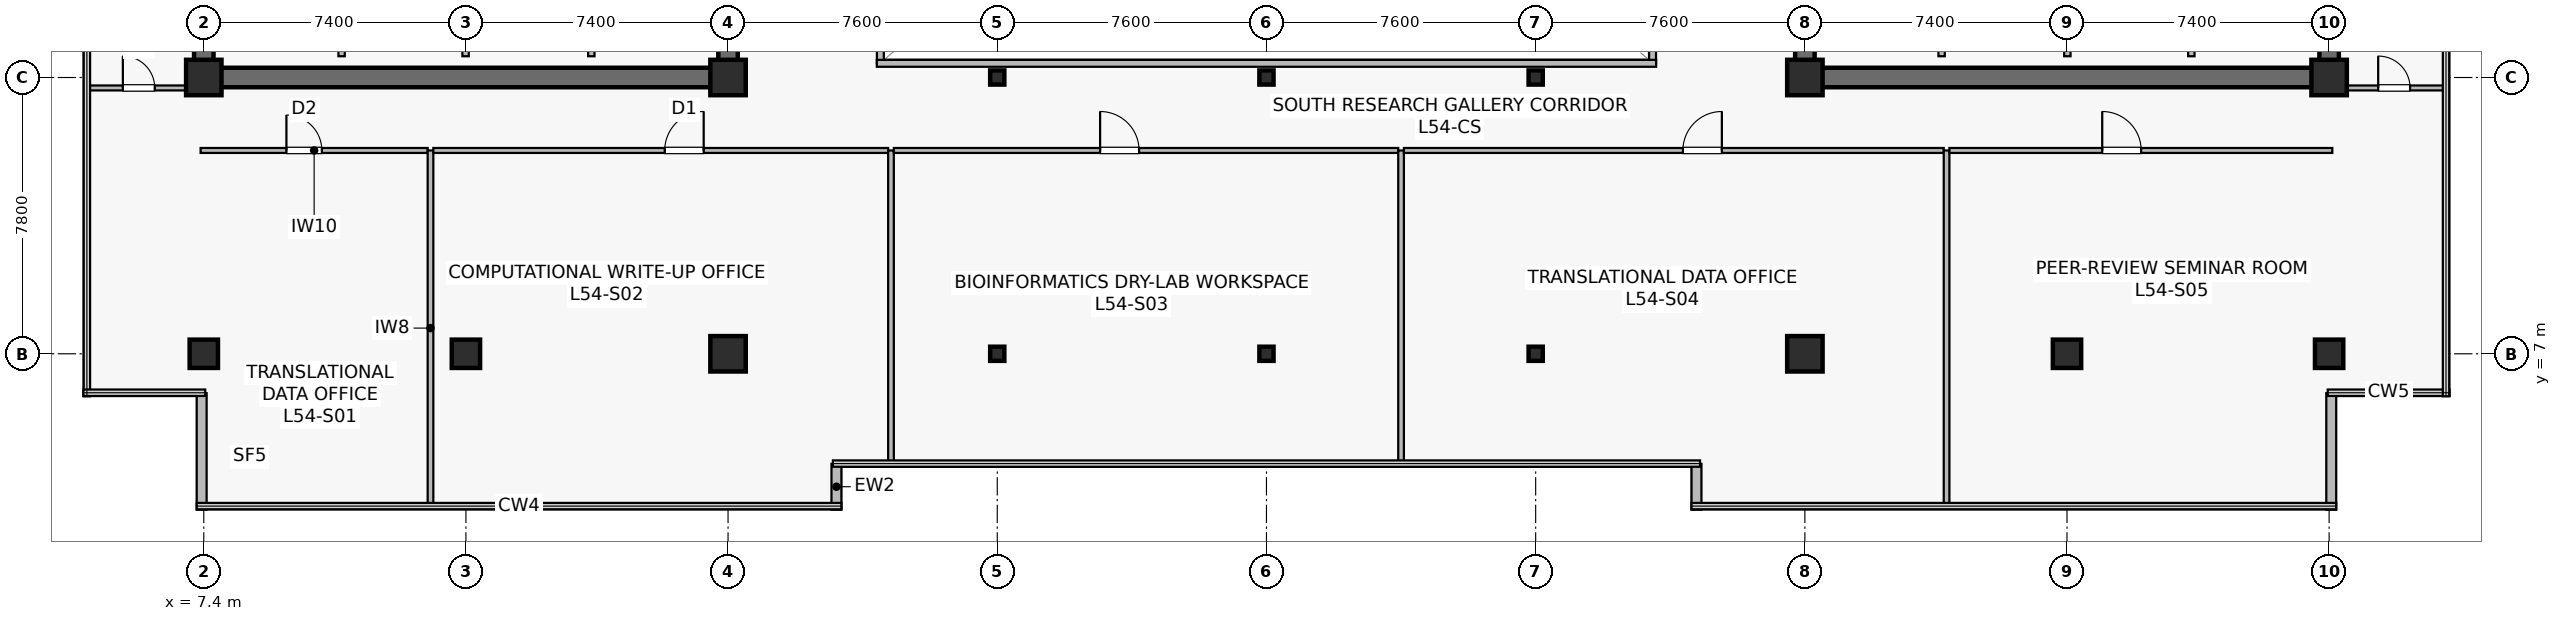
"""IFC4 building model, lengths in metres.
Left out: names, types, materials, properties, quantities, classifications, styles, units other than length and angle.
Written with IfcOpenShell. Run it as: python <this file> out.ifc"""

import sys

from ifc_helpers import new_model, si_unit, direction, frame, frame_2d, origin, origin_2d, place, context, subcontext, project, spatial, rectangle, hollow_rectangle, extrude, source, transform, mapped, element, fill, save


model = new_model("IFC4")
c1 = context("Model", 3, precision=1e-05, world=origin(), true_north=direction((0.0, 1.0)))
c2 = subcontext(c1, "Body", "Model", "MODEL_VIEW")
j1 = project(units=[si_unit("LENGTHUNIT", "METRE"), si_unit("PLANEANGLEUNIT", "RADIAN")], contexts=[c1])
p1 = place(None, origin())
s1 = spatial("IfcSite", under=j1, at=p1, CompositionType="ELEMENT")
p2 = place(p1, origin())
s2 = spatial("IfcBuilding", under=s1, at=p2, CompositionType="ELEMENT")
p3 = place(p2, frame((0.0, 0.0, 226.0)))
s3 = spatial("IfcBuildingStorey", under=s2, at=p3, CompositionType="ELEMENT", Elevation=226.0)
p4 = place(p3, frame((7.125, 14.8, 0.0), z_axis=(0.0, 0.0, 1.0), x_axis=(1.0, 0.0, 0.0)))
e1 = element("IfcWall", 1, at=p4, inside=s3, PredefinedType="SHEAR", context=c2, shape_type="SweptSolid", body=[
    extrude(rectangle(XDim=15.35, YDim=0.55, at=frame_2d((7.675, 0.0))), origin(), (0.0, 0.0, 1.0), 3.8),
])
p5 = place(p3, frame((7.4, 15.075, 0.0), z_axis=(0.0, 0.0, 1.0), x_axis=(0.0, 1.0, 0.0)))
e2 = element("IfcWall", 2, at=p5, inside=s3, PredefinedType="SHEAR", context=c2, shape_type="SweptSolid", body=[
    extrude(rectangle(XDim=18.45, YDim=0.55, at=frame_2d((9.225, 0.0))), origin(), (0.0, 0.0, 1.0), 3.8),
])
p6 = place(p3, frame((22.2, 15.075, 0.0), z_axis=(0.0, 0.0, 1.0), x_axis=(0.0, 1.0, 0.0)))
e3 = element("IfcWall", 3, at=p6, inside=s3, PredefinedType="SHEAR", context=c2, shape_type="SweptSolid", body=[
    extrude(rectangle(XDim=18.45, YDim=0.55, at=frame_2d((9.225, 0.0))), origin(), (0.0, 0.0, 1.0), 3.8),
])
p7 = place(p6, frame((3.475, 0.0, 0.0)))
e4 = element("IfcOpeningElement", 4, at=p7, cuts=e3, PredefinedType="OPENING", context=c2, shape_type="SweptSolid", body=[
    extrude(rectangle(XDim=1.42, YDim=2.2, at=frame_2d((0.71, 1.1))), frame((0.0, 0.285, 0.0), z_axis=(0.0, -1.0, 0.0), x_axis=(1.0, 0.0, 0.0)), (0.0, 0.0, 1.0), 0.57),
])
p8 = place(p3, frame((52.325, 14.8, 0.0), z_axis=(0.0, 0.0, 1.0), x_axis=(1.0, 0.0, 0.0)))
e5 = element("IfcWall", 5, at=p8, inside=s3, PredefinedType="SHEAR", context=c2, shape_type="SweptSolid", body=[
    extrude(rectangle(XDim=15.35, YDim=0.55, at=frame_2d((7.675, 0.0))), origin(), (0.0, 0.0, 1.0), 3.8),
])
p9 = place(p3, frame((52.6, 15.075, 0.0), z_axis=(0.0, 0.0, 1.0), x_axis=(0.0, 1.0, 0.0)))
e6 = element("IfcWall", 6, at=p9, inside=s3, PredefinedType="SHEAR", context=c2, shape_type="SweptSolid", body=[
    extrude(rectangle(XDim=18.45, YDim=0.55, at=frame_2d((9.225, 0.0))), origin(), (0.0, 0.0, 1.0), 3.8),
])
p10 = place(p9, frame((3.475, 0.0, 0.0)))
e7 = element("IfcOpeningElement", 7, at=p10, cuts=e6, PredefinedType="OPENING", context=c2, shape_type="SweptSolid", body=[
    extrude(rectangle(XDim=1.42, YDim=2.2, at=frame_2d((0.71, 1.1))), frame((0.0, 0.285, 0.0), z_axis=(0.0, -1.0, 0.0), x_axis=(1.0, 0.0, 0.0)), (0.0, 0.0, 1.0), 0.57),
])
p11 = place(p3, frame((67.4, 15.075, 0.0), z_axis=(0.0, 0.0, 1.0), x_axis=(0.0, 1.0, 0.0)))
e8 = element("IfcWall", 8, at=p11, inside=s3, PredefinedType="SHEAR", context=c2, shape_type="SweptSolid", body=[
    extrude(rectangle(XDim=18.45, YDim=0.55, at=frame_2d((9.225, 0.0))), origin(), (0.0, 0.0, 1.0), 3.8),
])
m1 = source(origin(), c2, "Body", "SweptSolid", [
    extrude(rectangle(XDim=0.8, YDim=0.8, at=origin_2d()), origin(), (0.0, 0.0, 1.0), 4.1),
])
p12 = place(p3, frame((14.8, 7.0, 0.0), z_axis=(0.0, 0.0, 1.0), x_axis=(1.0, 0.0, 0.0)))
e9 = element("IfcColumn", 9, at=p12, inside=s3, PredefinedType="COLUMN", context=c2, shape_type="MappedRepresentation", body=[
    mapped(m1, transform((0.0, 0.0, 0.0), scale=1.0)),
])
m2 = source(origin(), c2, "Body", "SweptSolid", [
    extrude(rectangle(XDim=1.0, YDim=1.0, at=origin_2d()), origin(), (0.0, 0.0, 1.0), 4.1),
])
for number, where, z_axis, x_axis in (
    (10, (22.2, 7.0, 0.0), (0.0, 0.0, 1.0), (1.0, 0.0, 0.0)),
    (11, (7.4, 14.8, 0.0), (0.0, 0.0, 1.0), (1.0, 0.0, 0.0)),
    (12, (22.2, 14.8, 0.0), (0.0, 0.0, 1.0), (1.0, 0.0, 0.0)),
    (13, (52.6, 7.0, 0.0), (0.0, 0.0, 1.0), (1.0, 0.0, 0.0)),
):
    element("IfcColumn", number, at=place(p3, frame(where, z_axis=z_axis, x_axis=x_axis)), inside=s3, PredefinedType="COLUMN", context=c2, shape_type="MappedRepresentation", body=[
        mapped(m2, transform((0.0, 0.0, 0.0), scale=1.0)),
    ])
p13 = place(p3, frame((60.0, 7.0, 0.0), z_axis=(0.0, 0.0, 1.0), x_axis=(1.0, 0.0, 0.0)))
e14 = element("IfcColumn", 14, at=p13, inside=s3, PredefinedType="COLUMN", context=c2, shape_type="MappedRepresentation", body=[
    mapped(m1, transform((0.0, 0.0, 0.0), scale=1.0)),
])
for number, where, z_axis, x_axis in (
    (15, (52.6, 14.8, 0.0), (0.0, 0.0, 1.0), (1.0, 0.0, 0.0)),
    (16, (67.4, 14.8, 0.0), (0.0, 0.0, 1.0), (1.0, 0.0, 0.0)),
):
    element("IfcColumn", number, at=place(p3, frame(where, z_axis=z_axis, x_axis=x_axis)), inside=s3, PredefinedType="COLUMN", context=c2, shape_type="MappedRepresentation", body=[
        mapped(m2, transform((0.0, 0.0, 0.0), scale=1.0)),
    ])
for number, where, z_axis, x_axis in (
    (17, (7.4, 7.0, 0.0), (0.0, 0.0, 1.0), (1.0, 0.0, 0.0)),
    (18, (67.4, 7.0, 0.0), (0.0, 0.0, 1.0), (1.0, 0.0, 0.0)),
):
    element("IfcColumn", number, at=place(p3, frame(where, z_axis=z_axis, x_axis=x_axis)), inside=s3, PredefinedType="COLUMN", context=c2, shape_type="MappedRepresentation", body=[
        mapped(m1, transform((0.0, 0.0, 0.0), scale=1.0)),
    ])
m3 = source(origin(), c2, "Body", "SweptSolid", [
    extrude(hollow_rectangle(XDim=0.4, YDim=0.4, WallThickness=0.019, at=origin_2d()), origin(), (0.0, 0.0, 1.0), 4.1),
])
for number, where, z_axis, x_axis in (
    (19, (29.8, 7.0, 0.0), (0.0, 0.0, 1.0), (1.0, 0.0, 0.0)),
    (20, (29.8, 14.8, 0.0), (0.0, 0.0, 1.0), (1.0, 0.0, 0.0)),
    (21, (37.4, 7.0, 0.0), (0.0, 0.0, 1.0), (1.0, 0.0, 0.0)),
    (22, (37.4, 14.8, 0.0), (0.0, 0.0, 1.0), (1.0, 0.0, 0.0)),
    (23, (45.0, 7.0, 0.0), (0.0, 0.0, 1.0), (1.0, 0.0, 0.0)),
    (24, (45.0, 14.8, 0.0), (0.0, 0.0, 1.0), (1.0, 0.0, 0.0)),
):
    element("IfcColumn", number, at=place(p3, frame(where, z_axis=z_axis, x_axis=x_axis)), inside=s3, PredefinedType="COLUMN", context=c2, shape_type="MappedRepresentation", body=[
        mapped(m3, transform((0.0, 0.0, 0.0), scale=1.0)),
    ])
for number, where, z_axis, x_axis in (
    (25, (25.26, 2.6, 0.0), (0.0, 0.0, 1.0), (0.0, 1.0, 0.0)),
    (26, (49.54, 3.893, 0.0), (0.0, 0.0, 1.0), (0.0, -1.0, 0.0)),
):
    element("IfcWall", number, at=place(p3, frame(where, z_axis=z_axis, x_axis=x_axis)), inside=s3, PredefinedType="STANDARD", context=c2, shape_type="SweptSolid", body=[
        extrude(rectangle(XDim=1.293, YDim=0.28, at=frame_2d((0.646, 0.0))), origin(), (0.0, 0.0, 1.0), 3.8),
    ])
for number, where, z_axis, x_axis in (
    (27, (67.46, 2.6, 0.0), (0.0, 0.0, 1.0), (0.0, 1.0, 0.0)),
    (28, (7.34, 5.888, 0.0), (0.0, 0.0, 1.0), (0.0, -1.0, 0.0)),
):
    element("IfcWall", number, at=place(p3, frame(where, z_axis=z_axis, x_axis=x_axis)), inside=s3, PredefinedType="STANDARD", context=c2, shape_type="SweptSolid", body=[
        extrude(rectangle(XDim=3.288, YDim=0.28, at=frame_2d((1.644, 0.0))), origin(), (0.0, 0.0, 1.0), 3.8),
    ])
p14 = place(p3, frame((11.29, 15.4, 0.0), z_axis=(0.0, 0.0, 1.0), x_axis=(0.0, 1.0, 0.0)))
e29 = element("IfcWall", 29, at=p14, inside=s3, PredefinedType="SOLIDWALL", context=c2, shape_type="SweptSolid", body=[
    extrude(rectangle(XDim=2.4, YDim=0.18, at=frame_2d((1.2, 0.0))), origin(), (0.0, 0.0, 1.0), 3.8),
])
p15 = place(p3, frame((14.79, 15.4, 0.0), z_axis=(0.0, 0.0, 1.0), x_axis=(0.0, 1.0, 0.0)))
e30 = element("IfcWall", 30, at=p15, inside=s3, PredefinedType="SOLIDWALL", context=c2, shape_type="SweptSolid", body=[
    extrude(rectangle(XDim=2.4, YDim=0.18, at=frame_2d((1.2, 0.0))), origin(), (0.0, 0.0, 1.0), 3.197),
])
for number, where, z_axis, x_axis in (
    (31, (18.34, 15.4, 0.0), (0.0, 0.0, 1.0), (0.0, 1.0, 0.0)),
    (32, (63.51, 15.4, 0.0), (0.0, 0.0, 1.0), (0.0, 1.0, 0.0)),
):
    element("IfcWall", number, at=place(p3, frame(where, z_axis=z_axis, x_axis=x_axis)), inside=s3, PredefinedType="SOLIDWALL", context=c2, shape_type="SweptSolid", body=[
        extrude(rectangle(XDim=2.4, YDim=0.18, at=frame_2d((1.2, 0.0))), origin(), (0.0, 0.0, 1.0), 3.8),
    ])
p16 = place(p3, frame((60.01, 15.4, 0.0), z_axis=(0.0, 0.0, 1.0), x_axis=(0.0, 1.0, 0.0)))
e33 = element("IfcWall", 33, at=p16, inside=s3, PredefinedType="SOLIDWALL", context=c2, shape_type="SweptSolid", body=[
    extrude(rectangle(XDim=2.4, YDim=0.18, at=frame_2d((1.2, 0.0))), origin(), (0.0, 0.0, 1.0), 3.197),
])
p17 = place(p3, frame((56.46, 15.4, 0.0), z_axis=(0.0, 0.0, 1.0), x_axis=(0.0, 1.0, 0.0)))
e34 = element("IfcWall", 34, at=p17, inside=s3, PredefinedType="SOLIDWALL", context=c2, shape_type="SweptSolid", body=[
    extrude(rectangle(XDim=2.4, YDim=0.18, at=frame_2d((1.2, 0.0))), origin(), (0.0, 0.0, 1.0), 3.8),
])
p18 = place(p3, frame((26.5, 15.2, 0.0), z_axis=(0.0, 0.0, 1.0), x_axis=(0.0, 1.0, 0.0)))
e35 = element("IfcWall", 35, at=p18, inside=s3, PredefinedType="SOLIDWALL", context=c2, shape_type="SweptSolid", body=[
    extrude(rectangle(XDim=18.2, YDim=0.195, at=frame_2d((9.1, 0.0))), origin(), (0.0, 0.0, 1.0), 3.8),
])
p19 = place(p18, frame((1.8, 0.0, 0.9)))
e36 = element("IfcOpeningElement", 36, at=p19, cuts=e35, PredefinedType="OPENING", context=c2, shape_type="SweptSolid", body=[
    extrude(rectangle(XDim=1.5, YDim=1.4, at=frame_2d((0.75, 0.7))), frame((0.0, 0.107, 0.0), z_axis=(0.0, -1.0, 0.0), x_axis=(1.0, 0.0, 0.0)), (0.0, 0.0, 1.0), 0.215),
])
p20 = place(p18, frame((13.2, 0.0, 0.9)))
e37 = element("IfcOpeningElement", 37, at=p20, cuts=e35, PredefinedType="OPENING", context=c2, shape_type="SweptSolid", body=[
    extrude(rectangle(XDim=1.5, YDim=1.4, at=frame_2d((0.75, 0.7))), frame((0.0, 0.107, 0.0), z_axis=(0.0, -1.0, 0.0), x_axis=(1.0, 0.0, 0.0)), (0.0, 0.0, 1.0), 0.215),
])
p21 = place(p3, frame((48.3, 15.2, 0.0), z_axis=(0.0, 0.0, 1.0), x_axis=(0.0, 1.0, 0.0)))
e38 = element("IfcWall", 38, at=p21, inside=s3, PredefinedType="SOLIDWALL", context=c2, shape_type="SweptSolid", body=[
    extrude(rectangle(XDim=18.2, YDim=0.195, at=frame_2d((9.1, 0.0))), origin(), (0.0, 0.0, 1.0), 3.8),
])
p22 = place(p21, frame((1.8, 0.0, 0.9)))
e39 = element("IfcOpeningElement", 39, at=p22, cuts=e38, PredefinedType="OPENING", context=c2, shape_type="SweptSolid", body=[
    extrude(rectangle(XDim=1.5, YDim=1.4, at=frame_2d((0.75, 0.7))), frame((0.0, 0.107, 0.0), z_axis=(0.0, -1.0, 0.0), x_axis=(1.0, 0.0, 0.0)), (0.0, 0.0, 1.0), 0.215),
])
p23 = place(p21, frame((13.2, 0.0, 0.9)))
e40 = element("IfcOpeningElement", 40, at=p23, cuts=e38, PredefinedType="OPENING", context=c2, shape_type="SweptSolid", body=[
    extrude(rectangle(XDim=1.5, YDim=1.4, at=frame_2d((0.75, 0.7))), frame((0.0, 0.107, 0.0), z_axis=(0.0, -1.0, 0.0), x_axis=(1.0, 0.0, 0.0)), (0.0, 0.0, 1.0), 0.215),
])
p24 = place(p3, frame((26.4, 15.2, 0.0), z_axis=(0.0, 0.0, 1.0), x_axis=(1.0, 0.0, 0.0)))
e41 = element("IfcWall", 41, at=p24, inside=s3, PredefinedType="SOLIDWALL", context=c2, shape_type="SweptSolid", body=[
    extrude(rectangle(XDim=22.0, YDim=0.195, at=frame_2d((11.0, 0.0))), origin(), (0.0, 0.0, 1.0), 3.8),
])
p25 = place(p3, frame((7.31, 12.74, 0.0), z_axis=(0.0, 0.0, 1.0), x_axis=(1.0, 0.0, 0.0)))
e42 = element("IfcWall", 42, at=p25, inside=s3, PredefinedType="PARTITIONING", context=c2, shape_type="SweptSolid", body=[
    extrude(rectangle(XDim=6.41, YDim=0.14, at=frame_2d((3.205, 0.0))), origin(), (0.0, 0.0, 1.0), 3.335),
])
p26 = place(p25, frame((2.422, 0.0, 0.0)))
e43 = element("IfcOpeningElement", 43, at=p26, cuts=e42, PredefinedType="OPENING", context=c2, shape_type="SweptSolid", body=[
    extrude(rectangle(XDim=1.0, YDim=2.15, at=frame_2d((0.5, 1.075))), frame((0.0, 0.08, 0.0), z_axis=(0.0, -1.0, 0.0), x_axis=(1.0, 0.0, 0.0)), (0.0, 0.0, 1.0), 0.16),
])
p27 = place(p3, frame((13.8, 2.71, 0.0), z_axis=(0.0, 0.0, 1.0), x_axis=(0.0, 1.0, 0.0)))
e44 = element("IfcWall", 44, at=p27, inside=s3, PredefinedType="PARTITIONING", context=c2, shape_type="SweptSolid", body=[
    extrude(rectangle(XDim=10.03, YDim=0.16, at=frame_2d((5.015, 0.0))), origin(), (0.0, 0.0, 1.0), 3.135),
])
p28 = place(p3, frame((13.88, 12.74, 0.0), z_axis=(0.0, 0.0, 1.0), x_axis=(1.0, 0.0, 0.0)))
e45 = element("IfcWall", 45, at=p28, inside=s3, PredefinedType="PARTITIONING", context=c2, shape_type="SweptSolid", body=[
    extrude(rectangle(XDim=12.84, YDim=0.14, at=frame_2d((6.42, 0.0))), origin(), (0.0, 0.0, 1.0), 3.197),
])
p29 = place(p28, frame((6.532, 0.0, 0.0)))
e46 = element("IfcOpeningElement", 46, at=p29, cuts=e45, PredefinedType="OPENING", context=c2, shape_type="SweptSolid", body=[
    extrude(rectangle(XDim=1.1, YDim=2.18, at=frame_2d((0.55, 1.09))), frame((0.0, 0.08, 0.0), z_axis=(0.0, -1.0, 0.0), x_axis=(1.0, 0.0, 0.0)), (0.0, 0.0, 1.0), 0.16),
])
p30 = place(p3, frame((26.8, 3.91, 0.0), z_axis=(0.0, 0.0, 1.0), x_axis=(0.0, 1.0, 0.0)))
e47 = element("IfcWall", 47, at=p30, inside=s3, PredefinedType="PARTITIONING", context=c2, shape_type="SweptSolid", body=[
    extrude(rectangle(XDim=8.83, YDim=0.16, at=frame_2d((4.415, 0.0))), origin(), (0.0, 0.0, 1.0), 3.135),
])
p31 = place(p3, frame((26.88, 12.74, 0.0), z_axis=(0.0, 0.0, 1.0), x_axis=(1.0, 0.0, 0.0)))
e48 = element("IfcWall", 48, at=p31, inside=s3, PredefinedType="PARTITIONING", context=c2, shape_type="SweptSolid", body=[
    extrude(rectangle(XDim=14.24, YDim=0.14, at=frame_2d((7.12, 0.0))), origin(), (0.0, 0.0, 1.0), 3.197),
])
p32 = place(p31, frame((5.823, 0.0, 0.0)))
e49 = element("IfcOpeningElement", 49, at=p32, cuts=e48, PredefinedType="OPENING", context=c2, shape_type="SweptSolid", body=[
    extrude(rectangle(XDim=1.1, YDim=2.18, at=frame_2d((0.55, 1.09))), frame((0.0, 0.08, 0.0), z_axis=(0.0, -1.0, 0.0), x_axis=(1.0, 0.0, 0.0)), (0.0, 0.0, 1.0), 0.16),
])
p33 = place(p3, frame((41.2, 3.91, 0.0), z_axis=(0.0, 0.0, 1.0), x_axis=(0.0, 1.0, 0.0)))
e50 = element("IfcWall", 50, at=p33, inside=s3, PredefinedType="PARTITIONING", context=c2, shape_type="SweptSolid", body=[
    extrude(rectangle(XDim=8.83, YDim=0.16, at=frame_2d((4.415, 0.0))), origin(), (0.0, 0.0, 1.0), 3.135),
])
p34 = place(p3, frame((41.28, 12.74, 0.0), z_axis=(0.0, 0.0, 1.0), x_axis=(1.0, 0.0, 0.0)))
e51 = element("IfcWall", 51, at=p34, inside=s3, PredefinedType="PARTITIONING", context=c2, shape_type="SweptSolid", body=[
    extrude(rectangle(XDim=15.24, YDim=0.14, at=frame_2d((7.62, 0.0))), origin(), (0.0, 0.0, 1.0), 3.197),
])
p35 = place(p34, frame((7.876, 0.0, 0.0)))
e52 = element("IfcOpeningElement", 52, at=p35, cuts=e51, PredefinedType="OPENING", context=c2, shape_type="SweptSolid", body=[
    extrude(rectangle(XDim=1.1, YDim=2.18, at=frame_2d((0.55, 1.09))), frame((0.0, 0.08, 0.0), z_axis=(0.0, -1.0, 0.0), x_axis=(1.0, 0.0, 0.0)), (0.0, 0.0, 1.0), 0.16),
])
p36 = place(p3, frame((56.6, 2.71, 0.0), z_axis=(0.0, 0.0, 1.0), x_axis=(0.0, 1.0, 0.0)))
e53 = element("IfcWall", 53, at=p36, inside=s3, PredefinedType="PARTITIONING", context=c2, shape_type="SweptSolid", body=[
    extrude(rectangle(XDim=10.03, YDim=0.16, at=frame_2d((5.015, 0.0))), origin(), (0.0, 0.0, 1.0), 3.135),
])
p37 = place(p3, frame((56.68, 12.74, 0.0), z_axis=(0.0, 0.0, 1.0), x_axis=(1.0, 0.0, 0.0)))
e54 = element("IfcWall", 54, at=p37, inside=s3, PredefinedType="PARTITIONING", context=c2, shape_type="SweptSolid", body=[
    extrude(rectangle(XDim=10.81, YDim=0.14, at=frame_2d((5.405, 0.0))), origin(), (0.0, 0.0, 1.0), 3.197),
])
p38 = place(p37, frame((4.314, 0.0, 0.0)))
e55 = element("IfcOpeningElement", 55, at=p38, cuts=e54, PredefinedType="OPENING", context=c2, shape_type="SweptSolid", body=[
    extrude(rectangle(XDim=1.1, YDim=2.18, at=frame_2d((0.55, 1.09))), frame((0.0, 0.08, 0.0), z_axis=(0.0, -1.0, 0.0), x_axis=(1.0, 0.0, 0.0)), (0.0, 0.0, 1.0), 0.16),
])
p39 = place(p3, frame((4.11, 14.505, 0.0), z_axis=(0.0, 0.0, 1.0), x_axis=(1.0, 0.0, 0.0)))
e56 = element("IfcWall", 56, at=p39, inside=s3, PredefinedType="PARTITIONING", context=c2, shape_type="SweptSolid", body=[
    extrude(rectangle(XDim=2.91, YDim=0.14, at=frame_2d((1.455, 0.0))), origin(), (0.0, 0.0, 1.0), 3.8),
])
p40 = place(p39, frame((1.005, 0.0, 0.0)))
e57 = element("IfcOpeningElement", 57, at=p40, cuts=e56, PredefinedType="OPENING", context=c2, shape_type="SweptSolid", body=[
    extrude(rectangle(XDim=0.9, YDim=2.1, at=frame_2d((0.45, 1.05))), frame((0.0, 0.08, 0.0), z_axis=(0.0, -1.0, 0.0), x_axis=(1.0, 0.0, 0.0)), (0.0, 0.0, 1.0), 0.16),
])
p41 = place(p3, frame((67.78, 14.505, 0.0), z_axis=(0.0, 0.0, 1.0), x_axis=(1.0, 0.0, 0.0)))
e58 = element("IfcWall", 58, at=p41, inside=s3, PredefinedType="PARTITIONING", context=c2, shape_type="SweptSolid", body=[
    extrude(rectangle(XDim=2.91, YDim=0.14, at=frame_2d((1.455, 0.0))), origin(), (0.0, 0.0, 1.0), 3.8),
])
p42 = place(p41, frame((1.005, 0.0, 0.0)))
e59 = element("IfcOpeningElement", 59, at=p42, cuts=e58, PredefinedType="OPENING", context=c2, shape_type="SweptSolid", body=[
    extrude(rectangle(XDim=0.9, YDim=2.1, at=frame_2d((0.45, 1.05))), frame((0.0, 0.08, 0.0), z_axis=(0.0, -1.0, 0.0), x_axis=(1.0, 0.0, 0.0)), (0.0, 0.0, 1.0), 0.16),
])
m4 = source(origin(), c2, "Body", "SweptSolid", [
    extrude(rectangle(XDim=1.0, YDim=2.15, at=frame_2d((0.5, 1.075))), frame((0.0, 0.025, 0.0), z_axis=(0.0, -1.0, 0.0), x_axis=(1.0, 0.0, 0.0)), (0.0, 0.0, 1.0), 0.05),
])
p43 = place(p26, origin())
e60 = element("IfcDoor", 60, at=p43, inside=s3, OperationType="SINGLE_SWING_LEFT", PredefinedType="DOOR", context=c2, shape_type="MappedRepresentation", body=[
    mapped(m4, transform((0.0, 0.0, 0.0), scale=1.0)),
])
fill(e43, e60)
m5 = source(origin(), c2, "Body", "SweptSolid", [
    extrude(rectangle(XDim=1.1, YDim=2.18, at=frame_2d((0.55, 1.09))), frame((0.0, 0.025, 0.0), z_axis=(0.0, -1.0, 0.0), x_axis=(1.0, 0.0, 0.0)), (0.0, 0.0, 1.0), 0.05),
])
p44 = place(p29, origin())
e61 = element("IfcDoor", 61, at=p44, inside=s3, OperationType="SINGLE_SWING_RIGHT", PredefinedType="DOOR", context=c2, shape_type="MappedRepresentation", body=[
    mapped(m5, transform((0.0, 0.0, 0.0), scale=1.0)),
])
fill(e46, e61)
p45 = place(p32, origin())
e62 = element("IfcDoor", 62, at=p45, inside=s3, OperationType="SINGLE_SWING_LEFT", PredefinedType="DOOR", context=c2, shape_type="MappedRepresentation", body=[
    mapped(m5, transform((0.0, 0.0, 0.0), scale=1.0)),
])
fill(e49, e62)
p46 = place(p35, origin())
e63 = element("IfcDoor", 63, at=p46, inside=s3, OperationType="SINGLE_SWING_RIGHT", PredefinedType="DOOR", context=c2, shape_type="MappedRepresentation", body=[
    mapped(m5, transform((0.0, 0.0, 0.0), scale=1.0)),
])
fill(e52, e63)
p47 = place(p38, origin())
e64 = element("IfcDoor", 64, at=p47, inside=s3, OperationType="SINGLE_SWING_LEFT", PredefinedType="DOOR", context=c2, shape_type="MappedRepresentation", body=[
    mapped(m5, transform((0.0, 0.0, 0.0), scale=1.0)),
])
fill(e55, e64)
m6 = source(origin(), c2, "Body", "SweptSolid", [
    extrude(rectangle(XDim=0.9, YDim=2.1, at=frame_2d((0.45, 1.05))), frame((0.0, 0.025, 0.0), z_axis=(0.0, -1.0, 0.0), x_axis=(1.0, 0.0, 0.0)), (0.0, 0.0, 1.0), 0.05),
])
p48 = place(p40, origin())
e65 = element("IfcDoor", 65, at=p48, inside=s3, OperationType="SINGLE_SWING_LEFT", PredefinedType="DOOR", context=c2, shape_type="MappedRepresentation", body=[
    mapped(m6, transform((0.0, 0.0, 0.0), scale=1.0)),
])
fill(e57, e65)
p49 = place(p42, origin())
e66 = element("IfcDoor", 66, at=p49, inside=s3, OperationType="SINGLE_SWING_LEFT", PredefinedType="DOOR", context=c2, shape_type="MappedRepresentation", body=[
    mapped(m6, transform((0.0, 0.0, 0.0), scale=1.0)),
])
fill(e59, e66)
save(model, sys.argv[1])
